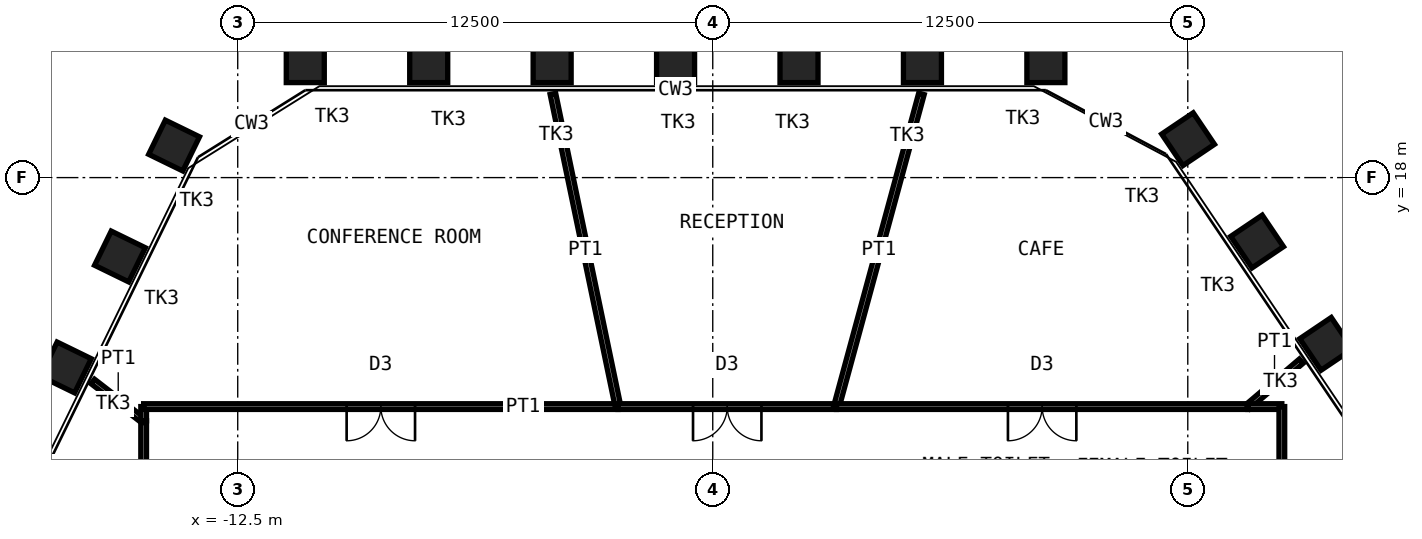
"""IFC4 building model, lengths in metres.
Left out: names, types, materials, properties, quantities, classifications, styles, units other than length and angle.
Written with IfcOpenShell. Run it as: python <this file> out.ifc"""

import sys

from ifc_helpers import new_model, si_unit, direction, frame, frame_2d, origin, origin_2d, place, context, subcontext, project, spatial, rectangle, hollow_rectangle, extrude, element, fill, save


model = new_model("IFC4")
c1 = context("Model", 3, precision=1e-05, world=origin(), true_north=direction((0.0, 1.0)))
c2 = subcontext(c1, "Body", "Model", "MODEL_VIEW")
j1 = project(units=[si_unit("LENGTHUNIT", "METRE"), si_unit("PLANEANGLEUNIT", "RADIAN")], contexts=[c1])
p1 = place(None, origin())
s1 = spatial("IfcSite", under=j1, at=p1, CompositionType="ELEMENT")
p2 = place(p1, origin())
s2 = spatial("IfcBuilding", under=s1, at=p2, CompositionType="ELEMENT")
p3 = place(p2, frame((0.0, 0.0, 262.0)))
s3 = spatial("IfcBuildingStorey", under=s2, at=p3, CompositionType="ELEMENT", Elevation=262.0)
for number, where, z_axis, x_axis in (
    (1, (-10.722, 21.0, 0.0), (0.0, 0.0, 1.0), (-1.0, 0.0, 0.0)),
    (2, (-7.474, 21.0, 0.0), (0.0, 0.0, 1.0), (-1.0, 0.0, 0.0)),
    (3, (-4.226, 21.0, 0.0), (0.0, 0.0, 1.0), (-1.0, 0.0, 0.0)),
    (4, (-0.978, 21.0, 0.0), (0.0, 0.0, 1.0), (-1.0, 0.0, 0.0)),
    (5, (2.27, 21.0, 0.0), (0.0, 0.0, 1.0), (-1.0, 0.0, 0.0)),
    (6, (5.518, 21.0, 0.0), (0.0, 0.0, 1.0), (-1.0, 0.0, 0.0)),
    (7, (8.766, 21.0, 0.0), (0.0, 0.0, 1.0), (-1.0, 0.0, 0.0)),
    (8, (12.508, 19.01, 0.0), (0.0, 0.0, 1.0), (-0.559, 0.829, 0.0)),
    (9, (14.324, 16.318, 0.0), (0.0, 0.0, 1.0), (-0.559, 0.829, 0.0)),
    (10, (16.141, 13.625, 0.0), (0.0, 0.0, 1.0), (-0.559, 0.829, 0.0)),
    (11, (-17.022, 13.004, 0.0), (0.0, 0.0, 1.0), (-0.438, -0.899, 0.0)),
    (12, (-15.598, 15.924, 0.0), (0.0, 0.0, 1.0), (-0.438, -0.899, 0.0)),
    (13, (-14.174, 18.843, 0.0), (0.0, 0.0, 1.0), (-0.438, -0.899, 0.0)),
):
    element("IfcColumn", number, at=place(p3, frame(where, z_axis=z_axis, x_axis=x_axis)), inside=s3, PredefinedType="COLUMN", context=c2, shape_type="SweptSolid", body=[
        extrude(hollow_rectangle(XDim=1.0, YDim=1.0, WallThickness=0.08, at=origin_2d()), origin(), (0.0, 0.0, 1.0), 4.2),
    ])
p4 = place(p3, frame((-14.975, 5.338, 0.0), z_axis=(0.0, 0.0, 1.0), x_axis=(0.0, 1.0, 0.0)))
e14 = element("IfcWall", 14, at=p4, inside=s3, PredefinedType="PARTITIONING", context=c2, shape_type="SweptSolid", body=[
    extrude(rectangle(XDim=6.261, YDim=0.15, at=frame_2d((3.13, 0.0))), origin(), (0.0, 0.0, 1.0), 4.03),
])
p5 = place(p4, frame((2.63, 0.0, 0.0)))
e15 = element("IfcOpeningElement", 15, at=p5, cuts=e14, PredefinedType="OPENING", context=c2, shape_type="SweptSolid", body=[
    extrude(rectangle(XDim=1.0, YDim=2.4, at=frame_2d((0.5, 1.2))), frame((0.0, 0.085, 0.0), z_axis=(0.0, -1.0, 0.0), x_axis=(1.0, 0.0, 0.0)), (0.0, 0.0, 1.0), 0.17),
])
p6 = place(p3, frame((-16.314, 12.636, 0.0), z_axis=(0.0, 0.0, 1.0), x_axis=(0.790507537632, -0.612452310753, 0.0)))
e16 = element("IfcWall", 16, at=p6, inside=s3, PredefinedType="PARTITIONING", context=c2, shape_type="SweptSolid", body=[
    extrude(rectangle(XDim=1.693, YDim=0.15, at=frame_2d((0.847, 0.0))), origin(), (0.0, 0.0, 1.0), 2.93),
])
p7 = place(p3, frame((-14.975, 11.599, 0.0), z_axis=(0.0, 0.0, 1.0), x_axis=(0.0, 1.0, 0.0)))
e17 = element("IfcWall", 17, at=p7, inside=s3, PredefinedType="PARTITIONING", context=c2, shape_type="SweptSolid", body=[
    extrude(rectangle(XDim=0.376, YDim=0.15, at=frame_2d((0.188, 0.0))), origin(), (0.0, 0.0, 1.0), 4.03),
])
p8 = place(p3, frame((-14.975, 11.975, 0.0), z_axis=(0.0, 0.0, 1.0), x_axis=(1.0, 0.0, 0.0)))
e18 = element("IfcWall", 18, at=p8, inside=s3, PredefinedType="PARTITIONING", context=c2, shape_type="SweptSolid", body=[
    extrude(rectangle(XDim=12.482, YDim=0.15, at=frame_2d((6.241, 0.0))), origin(), (0.0, 0.0, 1.0), 4.03),
])
p9 = place(p8, frame((5.341, 0.0, 0.0)))
e19 = element("IfcOpeningElement", 19, at=p9, cuts=e18, PredefinedType="OPENING", context=c2, shape_type="SweptSolid", body=[
    extrude(rectangle(XDim=1.8, YDim=2.4, at=frame_2d((0.9, 1.2))), frame((0.0, 0.085, 0.0), z_axis=(0.0, -1.0, 0.0), x_axis=(1.0, 0.0, 0.0)), (0.0, 0.0, 1.0), 0.17),
])
p10 = place(p3, frame((-4.206, 20.202, 0.0), z_axis=(0.0, 0.0, 1.0), x_axis=(0.203803429956, -0.979011829315, 0.0)))
e20 = element("IfcWall", 20, at=p10, inside=s3, PredefinedType="PARTITIONING", context=c2, shape_type="SweptSolid", body=[
    extrude(rectangle(XDim=8.403, YDim=0.15, at=frame_2d((4.202, 0.0))), origin(), (0.0, 0.0, 1.0), 2.93),
])
p11 = place(p3, frame((-2.493, 11.975, 0.0), z_axis=(0.0, 0.0, 1.0), x_axis=(1.0, 0.0, 0.0)))
e21 = element("IfcWall", 21, at=p11, inside=s3, PredefinedType="PARTITIONING", context=c2, shape_type="SweptSolid", body=[
    extrude(rectangle(XDim=5.748, YDim=0.15, at=frame_2d((2.874, 0.0))), origin(), (0.0, 0.0, 1.0), 4.03),
])
p12 = place(p11, frame((1.974, 0.0, 0.0)))
e22 = element("IfcOpeningElement", 22, at=p12, cuts=e21, PredefinedType="OPENING", context=c2, shape_type="SweptSolid", body=[
    extrude(rectangle(XDim=1.8, YDim=2.4, at=frame_2d((0.9, 1.2))), frame((0.0, 0.085, 0.0), z_axis=(0.0, -1.0, 0.0), x_axis=(1.0, 0.0, 0.0)), (0.0, 0.0, 1.0), 0.17),
])
p13 = place(p3, frame((5.492, 20.204, 0.0), z_axis=(0.0, 0.0, 1.0), x_axis=(-0.262317847929, -0.964981526589, 0.0)))
e23 = element("IfcWall", 23, at=p13, inside=s3, PredefinedType="PARTITIONING", context=c2, shape_type="SweptSolid", body=[
    extrude(rectangle(XDim=8.527, YDim=0.15, at=frame_2d((4.264, 0.0))), origin(), (0.0, 0.0, 1.0), 2.93),
])
p14 = place(p3, frame((3.255, 11.975, 0.0), z_axis=(0.0, 0.0, 1.0), x_axis=(1.0, 0.0, 0.0)))
e24 = element("IfcWall", 24, at=p14, inside=s3, PredefinedType="PARTITIONING", context=c2, shape_type="SweptSolid", body=[
    extrude(rectangle(XDim=10.826, YDim=0.15, at=frame_2d((5.413, 0.0))), origin(), (0.0, 0.0, 1.0), 4.03),
])
p15 = place(p14, frame((4.513, 0.0, 0.0)))
e25 = element("IfcOpeningElement", 25, at=p15, cuts=e24, PredefinedType="OPENING", context=c2, shape_type="SweptSolid", body=[
    extrude(rectangle(XDim=1.8, YDim=2.4, at=frame_2d((0.9, 1.2))), frame((0.0, 0.085, 0.0), z_axis=(0.0, -1.0, 0.0), x_axis=(1.0, 0.0, 0.0)), (0.0, 0.0, 1.0), 0.17),
])
p16 = place(p3, frame((15.484, 13.169, 0.0), z_axis=(0.0, 0.0, 1.0), x_axis=(-0.761730014246, -0.647894578923, 0.0)))
e26 = element("IfcWall", 26, at=p16, inside=s3, PredefinedType="PARTITIONING", context=c2, shape_type="SweptSolid", body=[
    extrude(rectangle(XDim=1.842, YDim=0.15, at=frame_2d((0.921, 0.0))), origin(), (0.0, 0.0, 1.0), 2.93),
])
p17 = place(p3, frame((14.081, 11.975, 0.0), z_axis=(0.0, 0.0, 1.0), x_axis=(1.0, 0.0, 0.0)))
e27 = element("IfcWall", 27, at=p17, inside=s3, PredefinedType="PARTITIONING", context=c2, shape_type="SweptSolid", body=[
    extrude(rectangle(XDim=0.895, YDim=0.15, at=frame_2d((0.447, 0.0))), origin(), (0.0, 0.0, 1.0), 4.03),
])
p18 = place(p3, frame((14.975, 11.975, 0.0), z_axis=(0.0, 0.0, 1.0), x_axis=(0.0, -1.0, 0.0)))
e28 = element("IfcWall", 28, at=p18, inside=s3, PredefinedType="PARTITIONING", context=c2, shape_type="SweptSolid", body=[
    extrude(rectangle(XDim=8.301, YDim=0.15, at=frame_2d((4.15, 0.0))), origin(), (0.0, 0.0, 1.0), 4.03),
])
p19 = place(p18, frame((3.25, 0.0, 0.0)))
e29 = element("IfcOpeningElement", 29, at=p19, cuts=e28, PredefinedType="OPENING", context=c2, shape_type="SweptSolid", body=[
    extrude(rectangle(XDim=1.8, YDim=2.4, at=frame_2d((0.9, 1.2))), frame((0.0, 0.085, 0.0), z_axis=(0.0, -1.0, 0.0), x_axis=(1.0, 0.0, 0.0)), (0.0, 0.0, 1.0), 0.17),
])
p20 = place(p9, origin())
e30 = element("IfcDoor", 30, at=p20, inside=s3, OperationType="DOUBLE_DOOR_DOUBLE_SWING", PredefinedType="DOOR", context=c2, shape_type="SweptSolid", body=[
    extrude(rectangle(XDim=1.8, YDim=2.4, at=frame_2d((0.9, 1.2))), frame((0.0, 0.025, 0.0), z_axis=(0.0, -1.0, 0.0), x_axis=(1.0, 0.0, 0.0)), (0.0, 0.0, 1.0), 0.05),
])
fill(e19, e30)
p21 = place(p12, origin())
e31 = element("IfcDoor", 31, at=p21, inside=s3, OperationType="DOUBLE_DOOR_DOUBLE_SWING", PredefinedType="DOOR", context=c2, shape_type="SweptSolid", body=[
    extrude(rectangle(XDim=1.8, YDim=2.4, at=frame_2d((0.9, 1.2))), frame((0.0, 0.025, 0.0), z_axis=(0.0, -1.0, 0.0), x_axis=(1.0, 0.0, 0.0)), (0.0, 0.0, 1.0), 0.05),
])
fill(e22, e31)
p22 = place(p15, origin())
e32 = element("IfcDoor", 32, at=p22, inside=s3, OperationType="DOUBLE_DOOR_DOUBLE_SWING", PredefinedType="DOOR", context=c2, shape_type="SweptSolid", body=[
    extrude(rectangle(XDim=1.8, YDim=2.4, at=frame_2d((0.9, 1.2))), frame((0.0, 0.025, 0.0), z_axis=(0.0, -1.0, 0.0), x_axis=(1.0, 0.0, 0.0)), (0.0, 0.0, 1.0), 0.05),
])
fill(e25, e32)
save(model, sys.argv[1])
